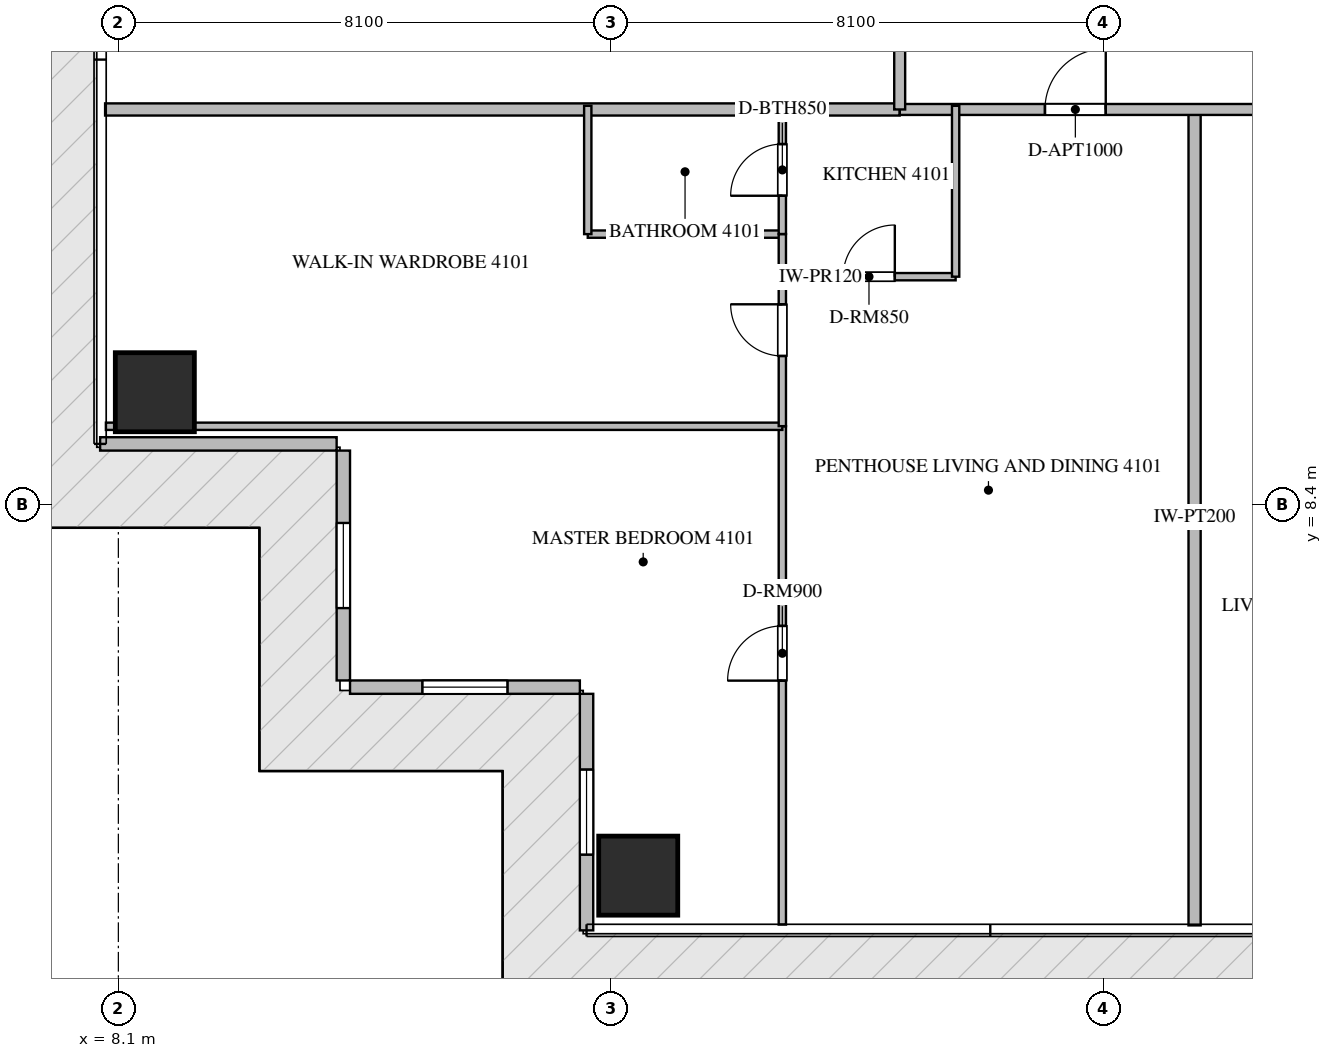
"""IFC4 building model, lengths in metres.
Left out: names, types, materials, properties, quantities, classifications, styles, units other than length and angle.
Written with IfcOpenShell. Run it as: python <this file> out.ifc"""

import sys

from ifc_helpers import new_model, si_unit, direction, frame, frame_2d, origin, origin_2d, place, context, subcontext, project, spatial, rectangle, extrude, source, transform, mapped, element, fill, save


model = new_model("IFC4")
c1 = context("Model", 3, precision=1e-05, world=origin(), true_north=direction((0.0, 1.0)))
c2 = subcontext(c1, "Body", "Model", "MODEL_VIEW")
j1 = project(units=[si_unit("LENGTHUNIT", "METRE"), si_unit("PLANEANGLEUNIT", "RADIAN")], contexts=[c1])
p1 = place(None, origin())
s1 = spatial("IfcSite", under=j1, at=p1, CompositionType="ELEMENT")
p2 = place(p1, origin())
s2 = spatial("IfcBuilding", under=s1, at=p2, CompositionType="ELEMENT")
p3 = place(p2, frame((0.0, 0.0, 165.15)))
s3 = spatial("IfcBuildingStorey", under=s2, at=p3, CompositionType="ELEMENT", Elevation=165.15)
m1 = source(origin(), c2, "Body", "SweptSolid", [
    extrude(rectangle(XDim=1.3, YDim=1.3, at=origin_2d()), origin(), (0.0, 0.0, 1.0), 3.75),
])
for number, where, z_axis, x_axis in (
    (1, (16.65, 2.3, -0.26), (0.0, 0.0, 1.0), (1.0, 0.0, 0.0)),
    (2, (8.7, 10.25, -0.26), (0.0, 0.0, 1.0), (1.0, 0.0, 0.0)),
):
    element("IfcColumn", number, at=place(p3, frame(where, z_axis=z_axis, x_axis=x_axis)), inside=s3, PredefinedType="COLUMN", context=c2, shape_type="MappedRepresentation", body=[
        mapped(m1, transform((0.0, 0.0, 0.0), scale=1.0)),
    ])
p4 = place(p3, frame((7.8, 9.4, 0.0), z_axis=(0.0, 0.0, 1.0), x_axis=(1.0, 0.0, 0.0)))
e3 = element("IfcWall", 3, at=p4, inside=s3, PredefinedType="ELEMENTEDWALL", context=c2, shape_type="SweptSolid", body=[
    extrude(rectangle(XDim=3.89, YDim=0.22, at=frame_2d((1.945, 0.0))), origin(), (0.0, 0.0, 1.0), 3.475),
])
p5 = place(p3, frame((11.8, 9.29, 0.0), z_axis=(0.0, 0.0, 1.0), x_axis=(0.0, -1.0, 0.0)))
e4 = element("IfcWall", 4, at=p5, inside=s3, PredefinedType="ELEMENTEDWALL", context=c2, shape_type="SweptSolid", body=[
    extrude(rectangle(XDim=3.78, YDim=0.22, at=frame_2d((1.89, 0.0))), origin(), (0.0, 0.0, 1.0), 3.475),
])
p6 = place(p5, frame((1.19, 0.0, 0.65)))
e5 = element("IfcOpeningElement", 5, at=p6, cuts=e4, PredefinedType="OPENING", context=c2, shape_type="SweptSolid", body=[
    extrude(rectangle(XDim=1.4, YDim=2.05, at=frame_2d((0.7, 1.025))), frame((0.0, 0.12, 0.0), z_axis=(0.0, -1.0, 0.0), x_axis=(1.0, 0.0, 0.0)), (0.0, 0.0, 1.0), 0.24),
])
p7 = place(p3, frame((11.91, 5.4, 0.0), z_axis=(0.0, 0.0, 1.0), x_axis=(1.0, 0.0, 0.0)))
e6 = element("IfcWall", 6, at=p7, inside=s3, PredefinedType="ELEMENTEDWALL", context=c2, shape_type="SweptSolid", body=[
    extrude(rectangle(XDim=3.78, YDim=0.22, at=frame_2d((1.89, 0.0))), origin(), (0.0, 0.0, 1.0), 3.475),
])
p8 = place(p7, frame((1.19, 0.0, 0.65)))
e7 = element("IfcOpeningElement", 7, at=p8, cuts=e6, PredefinedType="OPENING", context=c2, shape_type="SweptSolid", body=[
    extrude(rectangle(XDim=1.4, YDim=2.05, at=frame_2d((0.7, 1.025))), frame((0.0, 0.12, 0.0), z_axis=(0.0, -1.0, 0.0), x_axis=(1.0, 0.0, 0.0)), (0.0, 0.0, 1.0), 0.24),
])
p9 = place(p3, frame((15.8, 5.29, 0.0), z_axis=(0.0, 0.0, 1.0), x_axis=(0.0, -1.0, 0.0)))
e8 = element("IfcWall", 8, at=p9, inside=s3, PredefinedType="ELEMENTEDWALL", context=c2, shape_type="SweptSolid", body=[
    extrude(rectangle(XDim=3.89, YDim=0.22, at=frame_2d((1.945, 0.0))), origin(), (0.0, 0.0, 1.0), 3.475),
])
p10 = place(p9, frame((1.245, 0.0, 0.65)))
e9 = element("IfcOpeningElement", 9, at=p10, cuts=e8, PredefinedType="OPENING", context=c2, shape_type="SweptSolid", body=[
    extrude(rectangle(XDim=1.4, YDim=2.05, at=frame_2d((0.7, 1.025))), frame((0.0, 0.12, 0.0), z_axis=(0.0, -1.0, 0.0), x_axis=(1.0, 0.0, 0.0)), (0.0, 0.0, 1.0), 0.24),
])
p11 = place(p3, frame((25.8, 1.482, 0.0), z_axis=(0.0, 0.0, 1.0), x_axis=(0.0, 1.0, 0.0)))
e10 = element("IfcWall", 10, at=p11, inside=s3, PredefinedType="PARTITIONING", context=c2, shape_type="SweptSolid", body=[
    extrude(rectangle(XDim=13.418, YDim=0.2, at=frame_2d((6.709, 0.0))), origin(), (0.0, 0.0, 1.0), 3.49),
])
p12 = place(p3, frame((7.882, 14.9, 0.0), z_axis=(0.0, 0.0, 1.0), x_axis=(1.0, 0.0, 0.0)))
e11 = element("IfcWall", 11, at=p12, inside=s3, PredefinedType="PARTITIONING", context=c2, shape_type="SweptSolid", body=[
    extrude(rectangle(XDim=13.068, YDim=0.2, at=frame_2d((6.534, 0.0))), origin(), (0.0, 0.0, 1.0), 3.49),
])
p13 = place(p3, frame((20.952, 14.9, 0.0), z_axis=(0.0, 0.0, 1.0), x_axis=(1.0, 0.0, 0.0)))
e12 = element("IfcWall", 12, at=p13, inside=s3, PredefinedType="PARTITIONING", context=c2, shape_type="SweptSolid", body=[
    extrude(rectangle(XDim=22.896, YDim=0.18, at=frame_2d((11.448, 0.0))), origin(), (0.0, 0.0, 1.0), 3.49),
])
p14 = place(p13, frame((2.387, 0.0, 0.0)))
e13 = element("IfcOpeningElement", 13, at=p14, cuts=e12, PredefinedType="OPENING", context=c2, shape_type="SweptSolid", body=[
    extrude(rectangle(XDim=1.0, YDim=2.15, at=frame_2d((0.5, 1.075))), frame((0.0, 0.1, 0.0), z_axis=(0.0, -1.0, 0.0), x_axis=(1.0, 0.0, 0.0)), (0.0, 0.0, 1.0), 0.2),
])
p15 = place(p13, frame((6.788, 0.0, 0.0)))
e14 = element("IfcOpeningElement", 14, at=p15, cuts=e12, PredefinedType="OPENING", context=c2, shape_type="SweptSolid", body=[
    extrude(rectangle(XDim=1.0, YDim=2.15, at=frame_2d((0.5, 1.075))), frame((0.0, 0.1, 0.0), z_axis=(0.0, -1.0, 0.0), x_axis=(1.0, 0.0, 0.0)), (0.0, 0.0, 1.0), 0.2),
])
p16 = place(p13, frame((19.181, 0.0, 0.0)))
e15 = element("IfcOpeningElement", 15, at=p16, cuts=e12, PredefinedType="OPENING", context=c2, shape_type="SweptSolid", body=[
    extrude(rectangle(XDim=1.0, YDim=2.15, at=frame_2d((0.5, 1.075))), frame((0.0, 0.1, 0.0), z_axis=(0.0, -1.0, 0.0), x_axis=(1.0, 0.0, 0.0)), (0.0, 0.0, 1.0), 0.2),
])
p17 = place(p3, frame((20.95, 14.9, 0.0), z_axis=(0.0, 0.0, 1.0), x_axis=(0.0, 1.0, 0.0)))
e16 = element("IfcWall", 16, at=p17, inside=s3, PredefinedType="PARTITIONING", context=c2, shape_type="SweptSolid", body=[
    extrude(rectangle(XDim=18.7, YDim=0.18, at=frame_2d((9.35, 0.0))), origin(), (0.0, 0.0, 1.0), 3.49),
])
p18 = place(p17, frame((1.805, 0.0, 0.0)))
e17 = element("IfcOpeningElement", 17, at=p18, cuts=e16, PredefinedType="OPENING", context=c2, shape_type="SweptSolid", body=[
    extrude(rectangle(XDim=1.0, YDim=2.15, at=frame_2d((0.5, 1.075))), frame((0.0, 0.1, 0.0), z_axis=(0.0, -1.0, 0.0), x_axis=(1.0, 0.0, 0.0)), (0.0, 0.0, 1.0), 0.2),
])
p19 = place(p17, frame((15.257, 0.0, 0.0)))
e18 = element("IfcOpeningElement", 18, at=p19, cuts=e16, PredefinedType="OPENING", context=c2, shape_type="SweptSolid", body=[
    extrude(rectangle(XDim=1.0, YDim=2.15, at=frame_2d((0.5, 1.075))), frame((0.0, 0.1, 0.0), z_axis=(0.0, -1.0, 0.0), x_axis=(1.0, 0.0, 0.0)), (0.0, 0.0, 1.0), 0.2),
])
p20 = place(p3, frame((19.02, 12.15, 0.0), z_axis=(0.0, 0.0, 1.0), x_axis=(1.0, 0.0, 0.0)))
e19 = element("IfcWall", 19, at=p20, inside=s3, PredefinedType="PARTITIONING", context=c2, shape_type="SweptSolid", body=[
    extrude(rectangle(XDim=2.85, YDim=0.12, at=frame_2d((1.425, 0.0))), origin(), (0.0, 0.0, 1.0), 3.49),
])
p21 = place(p20, frame((1.0, 0.0, 0.0)))
e20 = element("IfcOpeningElement", 20, at=p21, cuts=e19, PredefinedType="OPENING", context=c2, shape_type="SweptSolid", body=[
    extrude(rectangle(XDim=0.85, YDim=2.1, at=frame_2d((0.425, 1.05))), frame((0.0, 0.07, 0.0), z_axis=(0.0, -1.0, 0.0), x_axis=(1.0, 0.0, 0.0)), (0.0, 0.0, 1.0), 0.14),
])
p22 = place(p3, frame((21.87, 12.15, 0.0), z_axis=(0.0, 0.0, 1.0), x_axis=(0.0, 1.0, 0.0)))
e21 = element("IfcWall", 21, at=p22, inside=s3, PredefinedType="PARTITIONING", context=c2, shape_type="SweptSolid", body=[
    extrude(rectangle(XDim=2.81, YDim=0.12, at=frame_2d((1.405, 0.0))), origin(), (0.0, 0.0, 1.0), 3.49),
])
p23 = place(p3, frame((19.02, 1.495, 0.0), z_axis=(0.0, 0.0, 1.0), x_axis=(0.0, 1.0, 0.0)))
e22 = element("IfcWall", 22, at=p23, inside=s3, PredefinedType="PARTITIONING", context=c2, shape_type="SweptSolid", body=[
    extrude(rectangle(XDim=8.195, YDim=0.12, at=frame_2d((4.097, 0.0))), origin(), (0.0, 0.0, 1.0), 3.49),
])
p24 = place(p23, frame((4.012, 0.0, 0.0)))
e23 = element("IfcOpeningElement", 23, at=p24, cuts=e22, PredefinedType="OPENING", context=c2, shape_type="SweptSolid", body=[
    extrude(rectangle(XDim=0.9, YDim=2.1, at=frame_2d((0.45, 1.05))), frame((0.0, 0.07, 0.0), z_axis=(0.0, -1.0, 0.0), x_axis=(1.0, 0.0, 0.0)), (0.0, 0.0, 1.0), 0.14),
])
p25 = place(p3, frame((7.895, 9.69, 0.0), z_axis=(0.0, 0.0, 1.0), x_axis=(1.0, 0.0, 0.0)))
e24 = element("IfcWall", 24, at=p25, inside=s3, PredefinedType="PARTITIONING", context=c2, shape_type="SweptSolid", body=[
    extrude(rectangle(XDim=11.125, YDim=0.12, at=frame_2d((5.562, 0.0))), origin(), (0.0, 0.0, 1.0), 3.49),
])
p26 = place(p3, frame((15.82, 12.85, 0.0), z_axis=(0.0, 0.0, 1.0), x_axis=(1.0, 0.0, 0.0)))
e25 = element("IfcWall", 25, at=p26, inside=s3, PredefinedType="PARTITIONING", context=c2, shape_type="SweptSolid", body=[
    extrude(rectangle(XDim=3.2, YDim=0.12, at=frame_2d((1.6, 0.0))), origin(), (0.0, 0.0, 1.0), 3.49),
])
p27 = place(p3, frame((15.82, 12.85, 0.0), z_axis=(0.0, 0.0, 1.0), x_axis=(0.0, 1.0, 0.0)))
e26 = element("IfcWall", 26, at=p27, inside=s3, PredefinedType="PARTITIONING", context=c2, shape_type="SweptSolid", body=[
    extrude(rectangle(XDim=2.11, YDim=0.12, at=frame_2d((1.055, 0.0))), origin(), (0.0, 0.0, 1.0), 3.49),
])
p28 = place(p3, frame((19.02, 9.692, 0.0), z_axis=(0.0, 0.0, 1.0), x_axis=(0.0, 1.0, 0.0)))
e27 = element("IfcWall", 27, at=p28, inside=s3, PredefinedType="PARTITIONING", context=c2, shape_type="SweptSolid", body=[
    extrude(rectangle(XDim=3.158, YDim=0.12, at=frame_2d((1.579, 0.0))), origin(), (0.0, 0.0, 1.0), 3.49),
])
p29 = place(p28, frame((1.154, 0.0, 0.0)))
e28 = element("IfcOpeningElement", 28, at=p29, cuts=e27, PredefinedType="OPENING", context=c2, shape_type="SweptSolid", body=[
    extrude(rectangle(XDim=0.85, YDim=2.1, at=frame_2d((0.425, 1.05))), frame((0.0, 0.07, 0.0), z_axis=(0.0, -1.0, 0.0), x_axis=(1.0, 0.0, 0.0)), (0.0, 0.0, 1.0), 0.14),
])
p30 = place(p3, frame((19.02, 12.852, 0.0), z_axis=(0.0, 0.0, 1.0), x_axis=(0.0, 1.0, 0.0)))
e29 = element("IfcWall", 29, at=p30, inside=s3, PredefinedType="PARTITIONING", context=c2, shape_type="SweptSolid", body=[
    extrude(rectangle(XDim=2.108, YDim=0.12, at=frame_2d((1.054, 0.0))), origin(), (0.0, 0.0, 1.0), 3.49),
])
p31 = place(p30, frame((0.629, 0.0, 0.0)))
e30 = element("IfcOpeningElement", 30, at=p31, cuts=e29, PredefinedType="OPENING", context=c2, shape_type="SweptSolid", body=[
    extrude(rectangle(XDim=0.85, YDim=2.1, at=frame_2d((0.425, 1.05))), frame((0.0, 0.07, 0.0), z_axis=(0.0, -1.0, 0.0), x_axis=(1.0, 0.0, 0.0)), (0.0, 0.0, 1.0), 0.14),
])
m2 = source(origin(), c2, "Body", "SweptSolid", [
    extrude(rectangle(XDim=1.4, YDim=2.05, at=frame_2d((0.7, 1.025))), frame((0.0, 0.03, 0.0), z_axis=(0.0, -1.0, 0.0), x_axis=(1.0, 0.0, 0.0)), (0.0, 0.0, 1.0), 0.06),
])
p32 = place(p6, origin())
e31 = element("IfcWindow", 31, at=p32, inside=s3, PartitioningType="SINGLE_PANEL", PredefinedType="WINDOW", context=c2, shape_type="MappedRepresentation", body=[
    mapped(m2, transform((0.0, 0.0, 0.0), scale=1.0)),
])
fill(e5, e31)
p33 = place(p8, origin())
e32 = element("IfcWindow", 32, at=p33, inside=s3, PartitioningType="SINGLE_PANEL", PredefinedType="WINDOW", context=c2, shape_type="MappedRepresentation", body=[
    mapped(m2, transform((0.0, 0.0, 0.0), scale=1.0)),
])
fill(e7, e32)
p34 = place(p10, origin())
e33 = element("IfcWindow", 33, at=p34, inside=s3, PartitioningType="SINGLE_PANEL", PredefinedType="WINDOW", context=c2, shape_type="MappedRepresentation", body=[
    mapped(m2, transform((0.0, 0.0, 0.0), scale=1.0)),
])
fill(e9, e33)
m3 = source(origin(), c2, "Body", "SweptSolid", [
    extrude(rectangle(XDim=1.0, YDim=2.15, at=frame_2d((0.5, 1.075))), frame((0.0, 0.025, 0.0), z_axis=(0.0, -1.0, 0.0), x_axis=(1.0, 0.0, 0.0)), (0.0, 0.0, 1.0), 0.05),
])
p35 = place(p14, origin())
e34 = element("IfcDoor", 34, at=p35, inside=s3, OperationType="SINGLE_SWING_RIGHT", PredefinedType="DOOR", context=c2, shape_type="MappedRepresentation", body=[
    mapped(m3, transform((0.0, 0.0, 0.0), scale=1.0)),
])
fill(e13, e34)
m4 = source(origin(), c2, "Body", "SweptSolid", [
    extrude(rectangle(XDim=0.85, YDim=2.1, at=frame_2d((0.425, 1.05))), frame((0.0, 0.025, 0.0), z_axis=(0.0, -1.0, 0.0), x_axis=(1.0, 0.0, 0.0)), (0.0, 0.0, 1.0), 0.05),
])
p36 = place(p21, origin())
e35 = element("IfcDoor", 35, at=p36, inside=s3, OperationType="SINGLE_SWING_RIGHT", PredefinedType="DOOR", context=c2, shape_type="MappedRepresentation", body=[
    mapped(m4, transform((0.0, 0.0, 0.0), scale=1.0)),
])
fill(e20, e35)
m5 = source(origin(), c2, "Body", "SweptSolid", [
    extrude(rectangle(XDim=0.9, YDim=2.1, at=frame_2d((0.45, 1.05))), frame((0.0, 0.025, 0.0), z_axis=(0.0, -1.0, 0.0), x_axis=(1.0, 0.0, 0.0)), (0.0, 0.0, 1.0), 0.05),
])
p37 = place(p24, origin())
e36 = element("IfcDoor", 36, at=p37, inside=s3, OperationType="SINGLE_SWING_LEFT", PredefinedType="DOOR", context=c2, shape_type="MappedRepresentation", body=[
    mapped(m5, transform((0.0, 0.0, 0.0), scale=1.0)),
])
fill(e23, e36)
p38 = place(p29, origin())
e37 = element("IfcDoor", 37, at=p38, inside=s3, OperationType="SINGLE_SWING_RIGHT", PredefinedType="DOOR", context=c2, shape_type="MappedRepresentation", body=[
    mapped(m4, transform((0.0, 0.0, 0.0), scale=1.0)),
])
fill(e28, e37)
p39 = place(p31, origin())
e38 = element("IfcDoor", 38, at=p39, inside=s3, OperationType="SINGLE_SWING_LEFT", PredefinedType="DOOR", context=c2, shape_type="MappedRepresentation", body=[
    mapped(m4, transform((0.0, 0.0, 0.0), scale=1.0)),
])
fill(e30, e38)
save(model, sys.argv[1])
